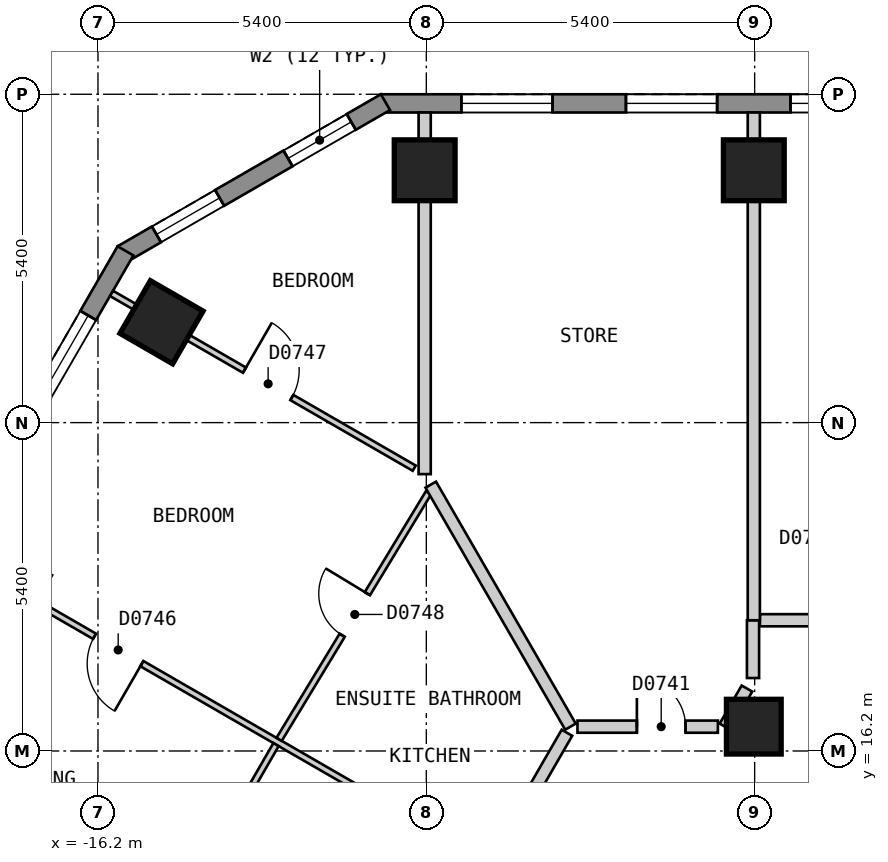
"""IFC4 building model, lengths in metres.
Left out: names, types, materials, properties, quantities, classifications, styles, units other than length and angle.
Written with IfcOpenShell. Run it as: python <this file> out.ifc"""

import sys

from ifc_helpers import new_model, si_unit, direction, frame, frame_2d, origin, origin_2d, place, context, subcontext, project, spatial, polyline, rectangle, outline, extrude, element, fill, save


model = new_model("IFC4")
c1 = context("Model", 3, precision=1e-05, world=origin(), true_north=direction((0.0, 1.0)))
c2 = subcontext(c1, "Body", "Model", "MODEL_VIEW")
j1 = project(units=[si_unit("LENGTHUNIT", "METRE"), si_unit("PLANEANGLEUNIT", "RADIAN")], contexts=[c1])
p1 = place(None, origin())
s1 = spatial("IfcSite", under=j1, at=p1, CompositionType="ELEMENT")
p2 = place(p1, origin())
s2 = spatial("IfcBuilding", under=s1, at=p2, CompositionType="ELEMENT")
p3 = place(p2, frame((0.0, 0.0, 99.0)))
s3 = spatial("IfcBuildingStorey", under=s2, at=p3, CompositionType="ELEMENT", Elevation=99.0)
for number, where, z_axis, x_axis in (
    (1, (-5.414, 25.75, 0.0), (0.0, 0.0, 1.0), (-1.0, 0.0, 0.0)),
    (2, (-10.827, 25.75, 0.0), (0.0, 0.0, 1.0), (-1.0, 0.0, 0.0)),
    (3, (-15.155, 23.251, 0.0), (0.0, 0.0, 1.0), (-0.5, -0.866, 0.0)),
):
    element("IfcColumn", number, at=place(p3, frame(where, z_axis=z_axis, x_axis=x_axis)), inside=s3, PredefinedType="COLUMN", context=c2, shape_type="SweptSolid", body=[
        extrude(rectangle(XDim=1.0, YDim=1.0, at=origin_2d()), origin(), (0.0, 0.0, 1.0), 3.0),
    ])
p4 = place(p3, frame((-5.414, 16.6, 0.0), z_axis=(0.0, 0.0, 1.0), x_axis=(-1.0, 0.0, 0.0)))
e4 = element("IfcColumn", 4, at=p4, inside=s3, PredefinedType="COLUMN", context=c2, shape_type="SweptSolid", body=[
    extrude(rectangle(XDim=0.9, YDim=0.9, at=origin_2d()), origin(), (0.0, 0.0, 1.0), 3.0),
])
p5 = place(p3, frame((11.547, 26.85, 0.0), z_axis=(0.0, 0.0, 1.0), x_axis=(-1.0, 0.0, 0.0)))
e5 = element("IfcWall", 5, at=p5, inside=s3, PredefinedType="SOLIDWALL", context=c2, shape_type="SweptSolid", body=[
    extrude(outline(polyline([(0.0, -0.15), (23.094, -0.15), (23.014, 0.15), (0.08, 0.15), (0.0, -0.15)])), origin(), (0.0, 0.0, 1.0), 2.7),
])
p6 = place(p5, frame((1.325, 0.0, 0.15)))
e6 = element("IfcOpeningElement", 6, at=p6, cuts=e5, PredefinedType="OPENING", context=c2, shape_type="SweptSolid", body=[
    extrude(rectangle(XDim=1.5, YDim=2.1, at=frame_2d((0.75, 1.05))), frame((0.0, 0.16, 0.0), z_axis=(0.0, -1.0, 0.0), x_axis=(1.0, 0.0, 0.0)), (0.0, 0.0, 1.0), 0.32),
])
p7 = place(p5, frame((4.032, 0.0, 0.15)))
e7 = element("IfcOpeningElement", 7, at=p7, cuts=e5, PredefinedType="OPENING", context=c2, shape_type="SweptSolid", body=[
    extrude(rectangle(XDim=1.5, YDim=2.1, at=frame_2d((0.75, 1.05))), frame((0.0, 0.16, 0.0), z_axis=(0.0, -1.0, 0.0), x_axis=(1.0, 0.0, 0.0)), (0.0, 0.0, 1.0), 0.32),
])
p8 = place(p5, frame((6.738, 0.0, 0.15)))
e8 = element("IfcOpeningElement", 8, at=p8, cuts=e5, PredefinedType="OPENING", context=c2, shape_type="SweptSolid", body=[
    extrude(rectangle(XDim=1.5, YDim=2.1, at=frame_2d((0.75, 1.05))), frame((0.0, 0.16, 0.0), z_axis=(0.0, -1.0, 0.0), x_axis=(1.0, 0.0, 0.0)), (0.0, 0.0, 1.0), 0.32),
])
p9 = place(p5, frame((9.445, 0.0, 0.15)))
e9 = element("IfcOpeningElement", 9, at=p9, cuts=e5, PredefinedType="OPENING", context=c2, shape_type="SweptSolid", body=[
    extrude(rectangle(XDim=1.5, YDim=2.1, at=frame_2d((0.75, 1.05))), frame((0.0, 0.16, 0.0), z_axis=(0.0, -1.0, 0.0), x_axis=(1.0, 0.0, 0.0)), (0.0, 0.0, 1.0), 0.32),
])
p10 = place(p5, frame((12.151, 0.0, 0.15)))
e10 = element("IfcOpeningElement", 10, at=p10, cuts=e5, PredefinedType="OPENING", context=c2, shape_type="SweptSolid", body=[
    extrude(rectangle(XDim=1.5, YDim=2.1, at=frame_2d((0.75, 1.05))), frame((0.0, 0.16, 0.0), z_axis=(0.0, -1.0, 0.0), x_axis=(1.0, 0.0, 0.0)), (0.0, 0.0, 1.0), 0.32),
])
p11 = place(p5, frame((14.858, 0.0, 0.15)))
e11 = element("IfcOpeningElement", 11, at=p11, cuts=e5, PredefinedType="OPENING", context=c2, shape_type="SweptSolid", body=[
    extrude(rectangle(XDim=1.5, YDim=2.1, at=frame_2d((0.75, 1.05))), frame((0.0, 0.16, 0.0), z_axis=(0.0, -1.0, 0.0), x_axis=(1.0, 0.0, 0.0)), (0.0, 0.0, 1.0), 0.32),
])
p12 = place(p5, frame((17.564, 0.0, 0.15)))
e12 = element("IfcOpeningElement", 12, at=p12, cuts=e5, PredefinedType="OPENING", context=c2, shape_type="SweptSolid", body=[
    extrude(rectangle(XDim=1.5, YDim=2.1, at=frame_2d((0.75, 1.05))), frame((0.0, 0.16, 0.0), z_axis=(0.0, -1.0, 0.0), x_axis=(1.0, 0.0, 0.0)), (0.0, 0.0, 1.0), 0.32),
])
p13 = place(p5, frame((20.271, 0.0, 0.15)))
e13 = element("IfcOpeningElement", 13, at=p13, cuts=e5, PredefinedType="OPENING", context=c2, shape_type="SweptSolid", body=[
    extrude(rectangle(XDim=1.5, YDim=2.1, at=frame_2d((0.75, 1.05))), frame((0.0, 0.16, 0.0), z_axis=(0.0, -1.0, 0.0), x_axis=(1.0, 0.0, 0.0)), (0.0, 0.0, 1.0), 0.32),
])
p14 = place(p3, frame((-11.472, 26.87, 0.0), z_axis=(0.0, 0.0, 1.0), x_axis=(-0.866022959057, -0.500004234368, 0.0)))
e14 = element("IfcWall", 14, at=p14, inside=s3, PredefinedType="SOLIDWALL", context=c2, shape_type="SweptSolid", body=[
    extrude(outline(polyline([(0.0, -0.15), (5.0, -0.15), (4.92, 0.15), (0.08, 0.15), (0.0, -0.15)])), origin(), (0.0, 0.0, 1.0), 2.7),
])
p15 = place(p14, frame((0.65, 0.0, 0.15)))
e15 = element("IfcOpeningElement", 15, at=p15, cuts=e14, PredefinedType="OPENING", context=c2, shape_type="SweptSolid", body=[
    extrude(rectangle(XDim=1.2, YDim=2.1, at=frame_2d((0.6, 1.05))), frame((0.0, 0.16, 0.0), z_axis=(0.0, -1.0, 0.0), x_axis=(1.0, 0.0, 0.0)), (0.0, 0.0, 1.0), 0.32),
])
p16 = place(p14, frame((3.149, 0.0, 0.15)))
e16 = element("IfcOpeningElement", 16, at=p16, cuts=e14, PredefinedType="OPENING", context=c2, shape_type="SweptSolid", body=[
    extrude(rectangle(XDim=1.2, YDim=2.1, at=frame_2d((0.6, 1.05))), frame((0.0, 0.16, 0.0), z_axis=(0.0, -1.0, 0.0), x_axis=(1.0, 0.0, 0.0)), (0.0, 0.0, 1.0), 0.32),
])
p17 = place(p3, frame((-15.747, 24.425, 0.0), z_axis=(0.0, 0.0, 1.0), x_axis=(-0.500027479704, -0.866009537788, 0.0)))
e17 = element("IfcWall", 17, at=p17, inside=s3, PredefinedType="SOLIDWALL", context=c2, shape_type="SweptSolid", body=[
    extrude(outline(polyline([(0.0, -0.15), (26.559, -0.15), (26.478, 0.15), (0.08, 0.15), (0.0, -0.15)])), origin(), (0.0, 0.0, 1.0), 2.7),
])
p18 = place(p17, frame((1.227, 0.0, 0.15)))
e18 = element("IfcOpeningElement", 18, at=p18, cuts=e17, PredefinedType="OPENING", context=c2, shape_type="SweptSolid", body=[
    extrude(rectangle(XDim=1.5, YDim=2.1, at=frame_2d((0.75, 1.05))), frame((0.0, 0.16, 0.0), z_axis=(0.0, -1.0, 0.0), x_axis=(1.0, 0.0, 0.0)), (0.0, 0.0, 1.0), 0.32),
])
p19 = place(p17, frame((3.739, 0.0, 0.15)))
e19 = element("IfcOpeningElement", 19, at=p19, cuts=e17, PredefinedType="OPENING", context=c2, shape_type="SweptSolid", body=[
    extrude(rectangle(XDim=1.5, YDim=2.1, at=frame_2d((0.75, 1.05))), frame((0.0, 0.16, 0.0), z_axis=(0.0, -1.0, 0.0), x_axis=(1.0, 0.0, 0.0)), (0.0, 0.0, 1.0), 0.32),
])
p20 = place(p17, frame((6.25, 0.0, 0.15)))
e20 = element("IfcOpeningElement", 20, at=p20, cuts=e17, PredefinedType="OPENING", context=c2, shape_type="SweptSolid", body=[
    extrude(rectangle(XDim=1.5, YDim=2.1, at=frame_2d((0.75, 1.05))), frame((0.0, 0.16, 0.0), z_axis=(0.0, -1.0, 0.0), x_axis=(1.0, 0.0, 0.0)), (0.0, 0.0, 1.0), 0.32),
])
p21 = place(p17, frame((8.761, 0.0, 0.15)))
e21 = element("IfcOpeningElement", 21, at=p21, cuts=e17, PredefinedType="OPENING", context=c2, shape_type="SweptSolid", body=[
    extrude(rectangle(XDim=1.5, YDim=2.1, at=frame_2d((0.75, 1.05))), frame((0.0, 0.16, 0.0), z_axis=(0.0, -1.0, 0.0), x_axis=(1.0, 0.0, 0.0)), (0.0, 0.0, 1.0), 0.32),
])
p22 = place(p17, frame((11.273, 0.0, 0.15)))
e22 = element("IfcOpeningElement", 22, at=p22, cuts=e17, PredefinedType="OPENING", context=c2, shape_type="SweptSolid", body=[
    extrude(rectangle(XDim=1.5, YDim=2.1, at=frame_2d((0.75, 1.05))), frame((0.0, 0.16, 0.0), z_axis=(0.0, -1.0, 0.0), x_axis=(1.0, 0.0, 0.0)), (0.0, 0.0, 1.0), 0.32),
])
p23 = place(p17, frame((13.785, 0.0, 0.15)))
e23 = element("IfcOpeningElement", 23, at=p23, cuts=e17, PredefinedType="OPENING", context=c2, shape_type="SweptSolid", body=[
    extrude(rectangle(XDim=1.5, YDim=2.1, at=frame_2d((0.75, 1.05))), frame((0.0, 0.16, 0.0), z_axis=(0.0, -1.0, 0.0), x_axis=(1.0, 0.0, 0.0)), (0.0, 0.0, 1.0), 0.32),
])
p24 = place(p17, frame((16.296, 0.0, 0.15)))
e24 = element("IfcOpeningElement", 24, at=p24, cuts=e17, PredefinedType="OPENING", context=c2, shape_type="SweptSolid", body=[
    extrude(rectangle(XDim=1.5, YDim=2.1, at=frame_2d((0.75, 1.05))), frame((0.0, 0.16, 0.0), z_axis=(0.0, -1.0, 0.0), x_axis=(1.0, 0.0, 0.0)), (0.0, 0.0, 1.0), 0.32),
])
p25 = place(p17, frame((18.807, 0.0, 0.15)))
e25 = element("IfcOpeningElement", 25, at=p25, cuts=e17, PredefinedType="OPENING", context=c2, shape_type="SweptSolid", body=[
    extrude(rectangle(XDim=1.5, YDim=2.1, at=frame_2d((0.75, 1.05))), frame((0.0, 0.16, 0.0), z_axis=(0.0, -1.0, 0.0), x_axis=(1.0, 0.0, 0.0)), (0.0, 0.0, 1.0), 0.32),
])
p26 = place(p17, frame((21.319, 0.0, 0.15)))
e26 = element("IfcOpeningElement", 26, at=p26, cuts=e17, PredefinedType="OPENING", context=c2, shape_type="SweptSolid", body=[
    extrude(rectangle(XDim=1.5, YDim=2.1, at=frame_2d((0.75, 1.05))), frame((0.0, 0.16, 0.0), z_axis=(0.0, -1.0, 0.0), x_axis=(1.0, 0.0, 0.0)), (0.0, 0.0, 1.0), 0.32),
])
p27 = place(p17, frame((23.831, 0.0, 0.15)))
e27 = element("IfcOpeningElement", 27, at=p27, cuts=e17, PredefinedType="OPENING", context=c2, shape_type="SweptSolid", body=[
    extrude(rectangle(XDim=1.5, YDim=2.1, at=frame_2d((0.75, 1.05))), frame((0.0, 0.16, 0.0), z_axis=(0.0, -1.0, 0.0), x_axis=(1.0, 0.0, 0.0)), (0.0, 0.0, 1.0), 0.32),
])
p28 = place(p3, frame((-8.314, 16.6, 0.0), z_axis=(0.0, 0.0, 1.0), x_axis=(1.0, 0.0, 0.0)))
e28 = element("IfcWall", 28, at=p28, inside=s3, PredefinedType="PARTITIONING", context=c2, shape_type="SweptSolid", body=[
    extrude(rectangle(XDim=2.309, YDim=0.2, at=frame_2d((1.155, 0.0))), origin(), (0.0, 0.0, 1.0), 2.7),
])
p29 = place(p28, frame((0.977, 0.0, 0.0)))
e29 = element("IfcOpeningElement", 29, at=p29, cuts=e28, PredefinedType="OPENING", context=c2, shape_type="SweptSolid", body=[
    extrude(rectangle(XDim=0.8, YDim=2.1, at=frame_2d((0.4, 1.05))), frame((0.0, 0.11, 0.0), z_axis=(0.0, -1.0, 0.0), x_axis=(1.0, 0.0, 0.0)), (0.0, 0.0, 1.0), 0.22),
])
p30 = place(p3, frame((-5.314, 18.35, 0.0), z_axis=(0.0, 0.0, 1.0), x_axis=(1.0, 0.0, 0.0)))
e30 = element("IfcWall", 30, at=p30, inside=s3, PredefinedType="PARTITIONING", context=c2, shape_type="SweptSolid", body=[
    extrude(rectangle(XDim=7.062, YDim=0.2, at=frame_2d((3.531, 0.0))), origin(), (0.0, 0.0, 1.0), 2.7),
])
p31 = place(p30, frame((2.106, 0.0, 0.0)))
e31 = element("IfcOpeningElement", 31, at=p31, cuts=e30, PredefinedType="OPENING", context=c2, shape_type="SweptSolid", body=[
    extrude(rectangle(XDim=1.0, YDim=2.1, at=frame_2d((0.5, 1.05))), frame((0.0, 0.11, 0.0), z_axis=(0.0, -1.0, 0.0), x_axis=(1.0, 0.0, 0.0)), (0.0, 0.0, 1.0), 0.22),
])
p32 = place(p3, frame((-5.889, 16.6, 0.0), z_axis=(0.0, 0.0, 1.0), x_axis=(0.499839240638, 0.866118198353, 0.0)))
e32 = element("IfcWall", 32, at=p32, inside=s3, PredefinedType="PARTITIONING", context=c2, shape_type="SweptSolid", body=[
    extrude(rectangle(XDim=0.724, YDim=0.2, at=frame_2d((0.362, 0.0))), origin(), (0.0, 0.0, 1.0), 2.7),
])
p33 = place(p3, frame((-18.533, -0.901, 0.0), z_axis=(0.0, 0.0, 1.0), x_axis=(0.499981198768, 0.866036258409, 0.0)))
e33 = element("IfcWall", 33, at=p33, inside=s3, PredefinedType="PARTITIONING", context=c2, shape_type="SweptSolid", body=[
    extrude(rectangle(XDim=20.093, YDim=0.2, at=frame_2d((10.046, 0.0))), origin(), (0.0, 0.0, 1.0), 2.7),
])
p34 = place(p33, frame((14.57, 0.0, 0.0)))
e34 = element("IfcOpeningElement", 34, at=p34, cuts=e33, PredefinedType="OPENING", context=c2, shape_type="SweptSolid", body=[
    extrude(rectangle(XDim=1.0, YDim=2.1, at=frame_2d((0.5, 1.05))), frame((0.0, 0.11, 0.0), z_axis=(0.0, -1.0, 0.0), x_axis=(1.0, 0.0, 0.0)), (0.0, 0.0, 1.0), 0.22),
])
p35 = place(p33, frame((4.523, 0.0, 0.0)))
e35 = element("IfcOpeningElement", 35, at=p35, cuts=e33, PredefinedType="OPENING", context=c2, shape_type="SweptSolid", body=[
    extrude(rectangle(XDim=1.0, YDim=2.1, at=frame_2d((0.5, 1.05))), frame((0.0, 0.11, 0.0), z_axis=(0.0, -1.0, 0.0), x_axis=(1.0, 0.0, 0.0)), (0.0, 0.0, 1.0), 0.22),
])
p36 = place(p3, frame((-5.427, 17.4, 0.0), z_axis=(0.0, 0.0, 1.0), x_axis=(0.0, 1.0, 0.0)))
e36 = element("IfcWall", 36, at=p36, inside=s3, PredefinedType="PARTITIONING", context=c2, shape_type="SweptSolid", body=[
    extrude(rectangle(XDim=0.95, YDim=0.2, at=frame_2d((0.475, 0.0))), origin(), (0.0, 0.0, 1.0), 2.7),
])
p37 = place(p3, frame((-18.489, 19.375, 0.0), z_axis=(0.0, 0.0, 1.0), x_axis=(0.866016855193, -0.500014806302, 0.0)))
e37 = element("IfcWall", 37, at=p37, inside=s3, PredefinedType="PARTITIONING", context=c2, shape_type="SweptSolid", body=[
    extrude(rectangle(XDim=10.0, YDim=0.1, at=frame_2d((5.0, 0.0))), origin(), (0.0, 0.0, 1.0), 2.7),
])
p38 = place(p37, frame((2.577, 0.0, 0.0)))
e38 = element("IfcOpeningElement", 38, at=p38, cuts=e37, PredefinedType="OPENING", context=c2, shape_type="SweptSolid", body=[
    extrude(rectangle(XDim=0.9, YDim=2.1, at=frame_2d((0.45, 1.05))), frame((0.0, 0.06, 0.0), z_axis=(0.0, -1.0, 0.0), x_axis=(1.0, 0.0, 0.0)), (0.0, 0.0, 1.0), 0.12),
])
p39 = place(p3, frame((-15.977, 23.725, 0.0), z_axis=(0.0, 0.0, 1.0), x_axis=(0.866028566888, -0.499994521305, 0.0)))
e39 = element("IfcWall", 39, at=p39, inside=s3, PredefinedType="PARTITIONING", context=c2, shape_type="SweptSolid", body=[
    extrude(rectangle(XDim=5.748, YDim=0.1, at=frame_2d((2.874, 0.0))), origin(), (0.0, 0.0, 1.0), 2.7),
])
p40 = place(p39, frame((2.524, 0.0, 0.0)))
e40 = element("IfcOpeningElement", 40, at=p40, cuts=e39, PredefinedType="OPENING", context=c2, shape_type="SweptSolid", body=[
    extrude(rectangle(XDim=0.9, YDim=2.1, at=frame_2d((0.45, 1.05))), frame((0.0, 0.06, 0.0), z_axis=(0.0, -1.0, 0.0), x_axis=(1.0, 0.0, 0.0)), (0.0, 0.0, 1.0), 0.12),
])
p41 = place(p3, frame((-13.221, 16.391, 0.0), z_axis=(0.0, 0.0, 1.0), x_axis=(0.518164725284, 0.855280841286, 0.0)))
e41 = element("IfcWall", 41, at=p41, inside=s3, PredefinedType="PARTITIONING", context=c2, shape_type="SweptSolid", body=[
    extrude(rectangle(XDim=4.74, YDim=0.1, at=frame_2d((2.37, 0.0))), origin(), (0.0, 0.0, 1.0), 2.7),
])
p42 = place(p41, frame((2.002, 0.0, 0.0)))
e42 = element("IfcOpeningElement", 42, at=p42, cuts=e41, PredefinedType="OPENING", context=c2, shape_type="SweptSolid", body=[
    extrude(rectangle(XDim=0.8, YDim=2.1, at=frame_2d((0.4, 1.05))), frame((0.0, 0.06, 0.0), z_axis=(0.0, -1.0, 0.0), x_axis=(1.0, 0.0, 0.0)), (0.0, 0.0, 1.0), 0.12),
])
p43 = place(p3, frame((-15.708, 12.085, 0.0), z_axis=(0.0, 0.0, 1.0), x_axis=(0.499943653708, 0.866057932887, 0.0)))
e43 = element("IfcWall", 43, at=p43, inside=s3, PredefinedType="PARTITIONING", context=c2, shape_type="SweptSolid", body=[
    extrude(rectangle(XDim=4.873, YDim=0.1, at=frame_2d((2.436, 0.0))), origin(), (0.0, 0.0, 1.0), 2.7),
])
p44 = place(p43, frame((1.962, 0.0, 0.0)))
e44 = element("IfcOpeningElement", 44, at=p44, cuts=e43, PredefinedType="OPENING", context=c2, shape_type="SweptSolid", body=[
    extrude(rectangle(XDim=0.9, YDim=2.1, at=frame_2d((0.45, 1.05))), frame((0.0, 0.06, 0.0), z_axis=(0.0, -1.0, 0.0), x_axis=(1.0, 0.0, 0.0)), (0.0, 0.0, 1.0), 0.12),
])
p45 = place(p3, frame((-10.727, 20.58, 0.0), z_axis=(0.0, 0.0, 1.0), x_axis=(0.500041272028, -0.866001574057, 0.0)))
e45 = element("IfcWall", 45, at=p45, inside=s3, PredefinedType="PARTITIONING", context=c2, shape_type="SweptSolid", body=[
    extrude(rectangle(XDim=4.596, YDim=0.2, at=frame_2d((2.298, 0.0))), origin(), (0.0, 0.0, 1.0), 2.7),
])
p46 = place(p3, frame((-5.414, 26.7, 0.0), z_axis=(0.0, 0.0, 1.0), x_axis=(0.0, -1.0, 0.0)))
e46 = element("IfcWall", 46, at=p46, inside=s3, PredefinedType="PARTITIONING", context=c2, shape_type="SweptSolid", body=[
    extrude(rectangle(XDim=8.35, YDim=0.2, at=frame_2d((4.175, 0.0))), origin(), (0.0, 0.0, 1.0), 2.7),
])
p47 = place(p3, frame((-10.827, 20.753, 0.0), z_axis=(0.0, 0.0, 1.0), x_axis=(0.0, 1.0, 0.0)))
e47 = element("IfcWall", 47, at=p47, inside=s3, PredefinedType="PARTITIONING", context=c2, shape_type="SweptSolid", body=[
    extrude(rectangle(XDim=5.947, YDim=0.2, at=frame_2d((2.974, 0.0))), origin(), (0.0, 0.0, 1.0), 2.7),
])
p48 = place(p11, origin())
e48 = element("IfcWindow", 48, at=p48, inside=s3, PartitioningType="SINGLE_PANEL", PredefinedType="WINDOW", context=c2, shape_type="SweptSolid", body=[
    extrude(rectangle(XDim=1.5, YDim=2.1, at=frame_2d((0.75, 1.05))), frame((0.0, 0.03, 0.0), z_axis=(0.0, -1.0, 0.0), x_axis=(1.0, 0.0, 0.0)), (0.0, 0.0, 1.0), 0.06),
])
fill(e11, e48)
p49 = place(p12, origin())
e49 = element("IfcWindow", 49, at=p49, inside=s3, PartitioningType="SINGLE_PANEL", PredefinedType="WINDOW", context=c2, shape_type="SweptSolid", body=[
    extrude(rectangle(XDim=1.5, YDim=2.1, at=frame_2d((0.75, 1.05))), frame((0.0, 0.03, 0.0), z_axis=(0.0, -1.0, 0.0), x_axis=(1.0, 0.0, 0.0)), (0.0, 0.0, 1.0), 0.06),
])
fill(e12, e49)
p50 = place(p13, origin())
e50 = element("IfcWindow", 50, at=p50, inside=s3, PartitioningType="SINGLE_PANEL", PredefinedType="WINDOW", context=c2, shape_type="SweptSolid", body=[
    extrude(rectangle(XDim=1.5, YDim=2.1, at=frame_2d((0.75, 1.05))), frame((0.0, 0.03, 0.0), z_axis=(0.0, -1.0, 0.0), x_axis=(1.0, 0.0, 0.0)), (0.0, 0.0, 1.0), 0.06),
])
fill(e13, e50)
p51 = place(p15, origin())
e51 = element("IfcWindow", 51, at=p51, inside=s3, PartitioningType="SINGLE_PANEL", PredefinedType="WINDOW", context=c2, shape_type="SweptSolid", body=[
    extrude(rectangle(XDim=1.2, YDim=2.1, at=frame_2d((0.6, 1.05))), frame((0.0, 0.03, 0.0), z_axis=(0.0, -1.0, 0.0), x_axis=(1.0, 0.0, 0.0)), (0.0, 0.0, 1.0), 0.06),
])
fill(e15, e51)
p52 = place(p16, origin())
e52 = element("IfcWindow", 52, at=p52, inside=s3, PartitioningType="SINGLE_PANEL", PredefinedType="WINDOW", context=c2, shape_type="SweptSolid", body=[
    extrude(rectangle(XDim=1.2, YDim=2.1, at=frame_2d((0.6, 1.05))), frame((0.0, 0.03, 0.0), z_axis=(0.0, -1.0, 0.0), x_axis=(1.0, 0.0, 0.0)), (0.0, 0.0, 1.0), 0.06),
])
fill(e16, e52)
p53 = place(p18, origin())
e53 = element("IfcWindow", 53, at=p53, inside=s3, PartitioningType="SINGLE_PANEL", PredefinedType="WINDOW", context=c2, shape_type="SweptSolid", body=[
    extrude(rectangle(XDim=1.5, YDim=2.1, at=frame_2d((0.75, 1.05))), frame((0.0, 0.03, 0.0), z_axis=(0.0, -1.0, 0.0), x_axis=(1.0, 0.0, 0.0)), (0.0, 0.0, 1.0), 0.06),
])
fill(e18, e53)
p54 = place(p29, origin())
e54 = element("IfcDoor", 54, at=p54, inside=s3, OperationType="SINGLE_SWING_LEFT", PredefinedType="DOOR", context=c2, shape_type="SweptSolid", body=[
    extrude(rectangle(XDim=0.8, YDim=2.1, at=frame_2d((0.4, 1.05))), frame((0.0, 0.025, 0.0), z_axis=(0.0, -1.0, 0.0), x_axis=(1.0, 0.0, 0.0)), (0.0, 0.0, 1.0), 0.05),
])
fill(e29, e54)
p55 = place(p38, origin())
e55 = element("IfcDoor", 55, at=p55, inside=s3, OperationType="SINGLE_SWING_RIGHT", PredefinedType="DOOR", context=c2, shape_type="SweptSolid", body=[
    extrude(rectangle(XDim=0.9, YDim=2.1, at=frame_2d((0.45, 1.05))), frame((0.0, 0.025, 0.0), z_axis=(0.0, -1.0, 0.0), x_axis=(1.0, 0.0, 0.0)), (0.0, 0.0, 1.0), 0.05),
])
fill(e38, e55)
p56 = place(p40, origin())
e56 = element("IfcDoor", 56, at=p56, inside=s3, OperationType="SINGLE_SWING_LEFT", PredefinedType="DOOR", context=c2, shape_type="SweptSolid", body=[
    extrude(rectangle(XDim=0.9, YDim=2.1, at=frame_2d((0.45, 1.05))), frame((0.0, 0.025, 0.0), z_axis=(0.0, -1.0, 0.0), x_axis=(1.0, 0.0, 0.0)), (0.0, 0.0, 1.0), 0.05),
])
fill(e40, e56)
p57 = place(p42, origin())
e57 = element("IfcDoor", 57, at=p57, inside=s3, OperationType="SINGLE_SWING_RIGHT", PredefinedType="DOOR", context=c2, shape_type="SweptSolid", body=[
    extrude(rectangle(XDim=0.8, YDim=2.1, at=frame_2d((0.4, 1.05))), frame((0.0, 0.025, 0.0), z_axis=(0.0, -1.0, 0.0), x_axis=(1.0, 0.0, 0.0)), (0.0, 0.0, 1.0), 0.05),
])
fill(e42, e57)
save(model, sys.argv[1])
